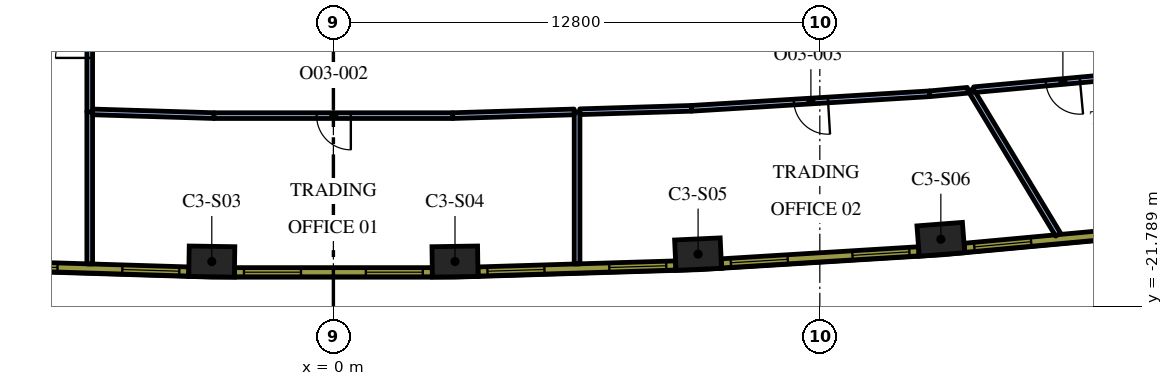
"""IFC4 building model, lengths in metres.
Left out: names, types, materials, properties, quantities, classifications, styles, units other than length and angle.
Written with IfcOpenShell. Run it as: python <this file> out.ifc"""

import sys

from ifc_helpers import new_model, si_unit, direction, frame, frame_2d, origin, origin_2d, place, context, subcontext, project, spatial, rectangle, extrude, element, fill, save


model = new_model("IFC4")
c1 = context("Model", 3, precision=1e-05, world=origin(), true_north=direction((0.0, 1.0)))
c2 = subcontext(c1, "Body", "Model", "MODEL_VIEW")
j1 = project(units=[si_unit("LENGTHUNIT", "METRE"), si_unit("PLANEANGLEUNIT", "RADIAN")], contexts=[c1])
p1 = place(None, origin())
s1 = spatial("IfcSite", under=j1, at=p1, CompositionType="ELEMENT")
p2 = place(p1, origin())
s2 = spatial("IfcBuilding", under=s1, at=p2, CompositionType="ELEMENT")
p3 = place(p2, frame((0.0, 0.0, 166.8)))
s3 = spatial("IfcBuildingStorey", under=s2, at=p3, CompositionType="ELEMENT", Elevation=166.8)
for number, where, z_axis, x_axis in (
    (1, (-3.2, -20.608, 0.0), (0.0, 0.0, 1.0), (1.0, -0.015, 0.0)),
    (2, (3.2, -20.608, 0.0), (0.0, 0.0, 1.0), (1.0, 0.015, 0.0)),
    (3, (9.597, -20.413, 0.0), (0.0, 0.0, 1.0), (0.999, 0.046, 0.0)),
    (4, (15.985, -20.022, 0.0), (0.0, 0.0, 1.0), (0.997, 0.076, 0.0)),
):
    element("IfcColumn", number, at=place(p3, frame(where, z_axis=z_axis, x_axis=x_axis)), inside=s3, PredefinedType="COLUMN", context=c2, shape_type="SweptSolid", body=[
        extrude(rectangle(XDim=1.2, YDim=0.8, at=origin_2d()), origin(), (0.0, 0.0, 1.0), 4.2),
    ])
p4 = place(p3, frame((-6.412, -16.664, 0.0), z_axis=(0.0, 0.0, 1.0), x_axis=(0.0, -1.0, 0.0)))
e5 = element("IfcWall", 5, at=p4, inside=s3, PredefinedType="PARTITIONING", context=c2, shape_type="SweptSolid", body=[
    extrude(rectangle(XDim=4.006, YDim=0.15, at=frame_2d((2.003, 0.0))), origin(), (0.0, 0.0, 1.0), 3.15),
])
p5 = place(p3, frame((-6.412, -16.672, 0.0), z_axis=(0.0, 0.0, 1.0), x_axis=(0.0, 1.0, 0.0)))
e6 = element("IfcWall", 6, at=p5, inside=s3, PredefinedType="PARTITIONING", context=c2, shape_type="SweptSolid", body=[
    extrude(rectangle(XDim=3.822, YDim=0.15, at=frame_2d((1.911, 0.0))), origin(), (0.0, 0.0, 1.0), 3.15),
])
p6 = place(p5, frame((1.422, 0.0, 0.0)))
e7 = element("IfcOpeningElement", 7, at=p6, cuts=e6, PredefinedType="OPENING", context=c2, shape_type="SweptSolid", body=[
    extrude(rectangle(XDim=0.9, YDim=2.1, at=frame_2d((0.45, 1.05))), frame((0.0, 0.085, 0.0), z_axis=(0.0, -1.0, 0.0), x_axis=(1.0, 0.0, 0.0)), (0.0, 0.0, 1.0), 0.17),
])
p7 = place(p3, frame((6.412, -16.668, 0.0), z_axis=(0.0, 0.0, 1.0), x_axis=(0.0, -1.0, 0.0)))
e8 = element("IfcWall", 8, at=p7, inside=s3, PredefinedType="PARTITIONING", context=c2, shape_type="SweptSolid", body=[
    extrude(rectangle(XDim=4.002, YDim=0.15, at=frame_2d((2.001, 0.0))), origin(), (0.0, 0.0, 1.0), 3.15),
])
p8 = place(p3, frame((-6.337, -16.671, 0.0), z_axis=(0.0, 0.0, 1.0), x_axis=(0.999533369646, -0.030545751995, 0.0)))
e9 = element("IfcWall", 9, at=p8, inside=s3, PredefinedType="PARTITIONING", context=c2, shape_type="SweptSolid", body=[
    extrude(rectangle(XDim=3.197, YDim=0.15, at=frame_2d((1.599, 0.0))), origin(), (0.0, 0.0, 1.0), 3.15),
])
p9 = place(p3, frame((3.141, -16.768, 0.0), z_axis=(0.0, 0.0, 1.0), x_axis=(-1.0, 0.0, 0.0)))
e10 = element("IfcWall", 10, at=p9, inside=s3, PredefinedType="PARTITIONING", context=c2, shape_type="SweptSolid", body=[
    extrude(rectangle(XDim=6.283, YDim=0.15, at=frame_2d((3.141, 0.0))), origin(), (0.0, 0.0, 1.0), 3.15),
])
p10 = place(p9, frame((2.683, 0.0, 0.0)))
e11 = element("IfcOpeningElement", 11, at=p10, cuts=e10, PredefinedType="OPENING", context=c2, shape_type="SweptSolid", body=[
    extrude(rectangle(XDim=0.9, YDim=2.1, at=frame_2d((0.45, 1.05))), frame((0.0, 0.085, 0.0), z_axis=(0.0, -1.0, 0.0), x_axis=(1.0, 0.0, 0.0)), (0.0, 0.0, 1.0), 0.17),
])
p11 = place(p3, frame((3.141, -16.768, 0.0), z_axis=(0.0, 0.0, 1.0), x_axis=(0.999533369646, 0.030545751995, 0.0)))
e12 = element("IfcWall", 12, at=p11, inside=s3, PredefinedType="PARTITIONING", context=c2, shape_type="SweptSolid", body=[
    extrude(rectangle(XDim=3.197, YDim=0.15, at=frame_2d((1.599, 0.0))), origin(), (0.0, 0.0, 1.0), 3.15),
])
p12 = place(p3, frame((16.773, -16.094, 0.0), z_axis=(0.0, 0.0, 1.0), x_axis=(0.516844039178, -0.856079575253, 0.0)))
e13 = element("IfcWall", 13, at=p12, inside=s3, PredefinedType="PARTITIONING", context=c2, shape_type="SweptSolid", body=[
    extrude(rectangle(XDim=4.446, YDim=0.15, at=frame_2d((2.223, 0.0))), origin(), (0.0, 0.0, 1.0), 3.15),
])
p13 = place(p3, frame((6.487, -16.666, 0.0), z_axis=(0.0, 0.0, 1.0), x_axis=(0.999533978083, 0.030525835896, 0.0)))
e14 = element("IfcWall", 14, at=p13, inside=s3, PredefinedType="PARTITIONING", context=c2, shape_type="SweptSolid", body=[
    extrude(rectangle(XDim=2.935, YDim=0.15, at=frame_2d((1.468, 0.0))), origin(), (0.0, 0.0, 1.0), 3.15),
])
p14 = place(p3, frame((15.692, -16.193, 0.0), z_axis=(0.0, 0.0, 1.0), x_axis=(-0.998137075468, -0.061011298754, 0.0)))
e15 = element("IfcWall", 15, at=p14, inside=s3, PredefinedType="PARTITIONING", context=c2, shape_type="SweptSolid", body=[
    extrude(rectangle(XDim=6.282, YDim=0.15, at=frame_2d((3.141, 0.0))), origin(), (0.0, 0.0, 1.0), 3.15),
])
p15 = place(p14, frame((2.683, 0.0, 0.0)))
e16 = element("IfcOpeningElement", 16, at=p15, cuts=e15, PredefinedType="OPENING", context=c2, shape_type="SweptSolid", body=[
    extrude(rectangle(XDim=0.9, YDim=2.1, at=frame_2d((0.45, 1.05))), frame((0.0, 0.085, 0.0), z_axis=(0.0, -1.0, 0.0), x_axis=(1.0, 0.0, 0.0)), (0.0, 0.0, 1.0), 0.17),
])
p16 = place(p3, frame((15.692, -16.193, 0.0), z_axis=(0.0, 0.0, 1.0), x_axis=(0.995818997537, 0.091348366946, 0.0)))
e17 = element("IfcWall", 17, at=p16, inside=s3, PredefinedType="PARTITIONING", context=c2, shape_type="SweptSolid", body=[
    extrude(rectangle(XDim=1.002, YDim=0.15, at=frame_2d((0.501, 0.0))), origin(), (0.0, 0.0, 1.0), 3.15),
])
p17 = place(p3, frame((21.525, -15.657, 0.0), z_axis=(0.0, 0.0, 1.0), x_axis=(-0.99581172086, -0.091427657734, 0.0)))
e18 = element("IfcWall", 18, at=p17, inside=s3, PredefinedType="PARTITIONING", context=c2, shape_type="SweptSolid", body=[
    extrude(rectangle(XDim=4.689, YDim=0.15, at=frame_2d((2.344, 0.0))), origin(), (0.0, 0.0, 1.0), 3.15),
])
p18 = place(p17, frame((1.889, 0.0, 0.0)))
e19 = element("IfcOpeningElement", 19, at=p18, cuts=e18, PredefinedType="OPENING", context=c2, shape_type="SweptSolid", body=[
    extrude(rectangle(XDim=0.9, YDim=2.1, at=frame_2d((0.45, 1.05))), frame((0.0, 0.085, 0.0), z_axis=(0.0, -1.0, 0.0), x_axis=(1.0, 0.0, 0.0)), (0.0, 0.0, 1.0), 0.17),
])
p19 = place(p3, frame((-9.007, -20.711, 0.0), z_axis=(0.0, 0.0, 1.0), x_axis=(0.999533441983, -0.030543384845, 0.0)))
e20 = element("IfcWall", 20, at=p19, inside=s3, PredefinedType="SOLIDWALL", context=c2, shape_type="SweptSolid", body=[
    extrude(rectangle(XDim=5.204, YDim=0.24, at=frame_2d((2.602, 0.0))), origin(), (0.0, 0.0, 1.0), 3.95),
])
p20 = place(p19, frame((0.248, 0.0, 0.9)))
e21 = element("IfcOpeningElement", 21, at=p20, cuts=e20, PredefinedType="OPENING", context=c2, shape_type="SweptSolid", body=[
    extrude(rectangle(XDim=1.5, YDim=2.55, at=frame_2d((0.75, 1.275))), frame((0.0, 0.13, 0.0), z_axis=(0.0, -1.0, 0.0), x_axis=(1.0, 0.0, 0.0)), (0.0, 0.0, 1.0), 0.26),
])
p21 = place(p19, frame((3.455, 0.0, 0.9)))
e22 = element("IfcOpeningElement", 22, at=p21, cuts=e20, PredefinedType="OPENING", context=c2, shape_type="SweptSolid", body=[
    extrude(rectangle(XDim=1.5, YDim=2.55, at=frame_2d((0.75, 1.275))), frame((0.0, 0.13, 0.0), z_axis=(0.0, -1.0, 0.0), x_axis=(1.0, 0.0, 0.0)), (0.0, 0.0, 1.0), 0.26),
])
p22 = place(p3, frame((-2.602, -20.888, 0.0), z_axis=(0.0, 0.0, 1.0), x_axis=(1.0, 0.0, 0.0)))
e23 = element("IfcWall", 23, at=p22, inside=s3, PredefinedType="SOLIDWALL", context=c2, shape_type="SweptSolid", body=[
    extrude(rectangle(XDim=5.204, YDim=0.24, at=frame_2d((2.602, 0.0))), origin(), (0.0, 0.0, 1.0), 3.95),
])
p23 = place(p22, frame((0.248, 0.0, 0.9)))
e24 = element("IfcOpeningElement", 24, at=p23, cuts=e23, PredefinedType="OPENING", context=c2, shape_type="SweptSolid", body=[
    extrude(rectangle(XDim=1.5, YDim=2.55, at=frame_2d((0.75, 1.275))), frame((0.0, 0.13, 0.0), z_axis=(0.0, -1.0, 0.0), x_axis=(1.0, 0.0, 0.0)), (0.0, 0.0, 1.0), 0.26),
])
p24 = place(p22, frame((3.455, 0.0, 0.9)))
e25 = element("IfcOpeningElement", 25, at=p24, cuts=e23, PredefinedType="OPENING", context=c2, shape_type="SweptSolid", body=[
    extrude(rectangle(XDim=1.5, YDim=2.55, at=frame_2d((0.75, 1.275))), frame((0.0, 0.13, 0.0), z_axis=(0.0, -1.0, 0.0), x_axis=(1.0, 0.0, 0.0)), (0.0, 0.0, 1.0), 0.26),
])
p25 = place(p3, frame((3.806, -20.87, 0.0), z_axis=(0.0, 0.0, 1.0), x_axis=(0.999533441983, 0.030543384845, 0.0)))
e26 = element("IfcWall", 26, at=p25, inside=s3, PredefinedType="SOLIDWALL", context=c2, shape_type="SweptSolid", body=[
    extrude(rectangle(XDim=5.204, YDim=0.24, at=frame_2d((2.602, 0.0))), origin(), (0.0, 0.0, 1.0), 3.95),
])
p26 = place(p25, frame((0.248, 0.0, 0.9)))
e27 = element("IfcOpeningElement", 27, at=p26, cuts=e26, PredefinedType="OPENING", context=c2, shape_type="SweptSolid", body=[
    extrude(rectangle(XDim=1.5, YDim=2.55, at=frame_2d((0.75, 1.275))), frame((0.0, 0.13, 0.0), z_axis=(0.0, -1.0, 0.0), x_axis=(1.0, 0.0, 0.0)), (0.0, 0.0, 1.0), 0.26),
])
p27 = place(p25, frame((3.455, 0.0, 0.9)))
e28 = element("IfcOpeningElement", 28, at=p27, cuts=e26, PredefinedType="OPENING", context=c2, shape_type="SweptSolid", body=[
    extrude(rectangle(XDim=1.5, YDim=2.55, at=frame_2d((0.75, 1.275))), frame((0.0, 0.13, 0.0), z_axis=(0.0, -1.0, 0.0), x_axis=(1.0, 0.0, 0.0)), (0.0, 0.0, 1.0), 0.26),
])
p28 = place(p3, frame((10.211, -20.656, 0.0), z_axis=(0.0, 0.0, 1.0), x_axis=(0.998135294646, 0.061040425794, 0.0)))
e29 = element("IfcWall", 29, at=p28, inside=s3, PredefinedType="SOLIDWALL", context=c2, shape_type="SweptSolid", body=[
    extrude(rectangle(XDim=5.204, YDim=0.24, at=frame_2d((2.602, 0.0))), origin(), (0.0, 0.0, 1.0), 3.95),
])
p29 = place(p28, frame((0.248, 0.0, 0.9)))
e30 = element("IfcOpeningElement", 30, at=p29, cuts=e29, PredefinedType="OPENING", context=c2, shape_type="SweptSolid", body=[
    extrude(rectangle(XDim=1.5, YDim=2.55, at=frame_2d((0.75, 1.275))), frame((0.0, 0.13, 0.0), z_axis=(0.0, -1.0, 0.0), x_axis=(1.0, 0.0, 0.0)), (0.0, 0.0, 1.0), 0.26),
])
p30 = place(p28, frame((3.455, 0.0, 0.9)))
e31 = element("IfcOpeningElement", 31, at=p30, cuts=e29, PredefinedType="OPENING", context=c2, shape_type="SweptSolid", body=[
    extrude(rectangle(XDim=1.5, YDim=2.55, at=frame_2d((0.75, 1.275))), frame((0.0, 0.13, 0.0), z_axis=(0.0, -1.0, 0.0), x_axis=(1.0, 0.0, 0.0)), (0.0, 0.0, 1.0), 0.26),
])
p31 = place(p3, frame((16.606, -20.247, 0.0), z_axis=(0.0, 0.0, 1.0), x_axis=(0.995808712151, 0.091460422067, 0.0)))
e32 = element("IfcWall", 32, at=p31, inside=s3, PredefinedType="SOLIDWALL", context=c2, shape_type="SweptSolid", body=[
    extrude(rectangle(XDim=5.213, YDim=0.24, at=frame_2d((2.606, 0.0))), origin(), (0.0, 0.0, 1.0), 3.95),
])
p32 = place(p31, frame((0.261, 0.0, 0.9)))
e33 = element("IfcOpeningElement", 33, at=p32, cuts=e32, PredefinedType="OPENING", context=c2, shape_type="SweptSolid", body=[
    extrude(rectangle(XDim=1.5, YDim=2.55, at=frame_2d((0.75, 1.275))), frame((0.0, 0.13, 0.0), z_axis=(0.0, -1.0, 0.0), x_axis=(1.0, 0.0, 0.0)), (0.0, 0.0, 1.0), 0.26),
])
p33 = place(p31, frame((3.492, 0.0, 0.9)))
e34 = element("IfcOpeningElement", 34, at=p33, cuts=e32, PredefinedType="OPENING", context=c2, shape_type="SweptSolid", body=[
    extrude(rectangle(XDim=1.5, YDim=2.55, at=frame_2d((0.75, 1.275))), frame((0.0, 0.13, 0.0), z_axis=(0.0, -1.0, 0.0), x_axis=(1.0, 0.0, 0.0)), (0.0, 0.0, 1.0), 0.26),
])
p34 = place(p6, origin())
e35 = element("IfcDoor", 35, at=p34, inside=s3, OperationType="SINGLE_SWING_LEFT", PredefinedType="DOOR", context=c2, shape_type="SweptSolid", body=[
    extrude(rectangle(XDim=0.9, YDim=2.1, at=frame_2d((0.45, 1.05))), frame((0.0, 0.025, 0.0), z_axis=(0.0, -1.0, 0.0), x_axis=(1.0, 0.0, 0.0)), (0.0, 0.0, 1.0), 0.05),
])
fill(e7, e35)
p35 = place(p10, origin())
e36 = element("IfcDoor", 36, at=p35, inside=s3, OperationType="SINGLE_SWING_LEFT", PredefinedType="DOOR", context=c2, shape_type="SweptSolid", body=[
    extrude(rectangle(XDim=0.9, YDim=2.1, at=frame_2d((0.45, 1.05))), frame((0.0, 0.025, 0.0), z_axis=(0.0, -1.0, 0.0), x_axis=(1.0, 0.0, 0.0)), (0.0, 0.0, 1.0), 0.05),
])
fill(e11, e36)
p36 = place(p15, origin())
e37 = element("IfcDoor", 37, at=p36, inside=s3, OperationType="SINGLE_SWING_LEFT", PredefinedType="DOOR", context=c2, shape_type="SweptSolid", body=[
    extrude(rectangle(XDim=0.9, YDim=2.1, at=frame_2d((0.45, 1.05))), frame((0.0, 0.025, 0.0), z_axis=(0.0, -1.0, 0.0), x_axis=(1.0, 0.0, 0.0)), (0.0, 0.0, 1.0), 0.05),
])
fill(e16, e37)
p37 = place(p18, origin())
e38 = element("IfcDoor", 38, at=p37, inside=s3, OperationType="SINGLE_SWING_LEFT", PredefinedType="DOOR", context=c2, shape_type="SweptSolid", body=[
    extrude(rectangle(XDim=0.9, YDim=2.1, at=frame_2d((0.45, 1.05))), frame((0.0, 0.025, 0.0), z_axis=(0.0, -1.0, 0.0), x_axis=(1.0, 0.0, 0.0)), (0.0, 0.0, 1.0), 0.05),
])
fill(e19, e38)
p38 = place(p20, origin())
e39 = element("IfcWindow", 39, at=p38, inside=s3, PartitioningType="SINGLE_PANEL", PredefinedType="WINDOW", context=c2, shape_type="SweptSolid", body=[
    extrude(rectangle(XDim=1.5, YDim=2.55, at=frame_2d((0.75, 1.275))), frame((0.0, 0.04, 0.0), z_axis=(0.0, -1.0, 0.0), x_axis=(1.0, 0.0, 0.0)), (0.0, 0.0, 1.0), 0.06),
])
fill(e21, e39)
p39 = place(p21, origin())
e40 = element("IfcWindow", 40, at=p39, inside=s3, PartitioningType="SINGLE_PANEL", PredefinedType="WINDOW", context=c2, shape_type="SweptSolid", body=[
    extrude(rectangle(XDim=1.5, YDim=2.55, at=frame_2d((0.75, 1.275))), frame((0.0, 0.04, 0.0), z_axis=(0.0, -1.0, 0.0), x_axis=(1.0, 0.0, 0.0)), (0.0, 0.0, 1.0), 0.06),
])
fill(e22, e40)
p40 = place(p23, origin())
e41 = element("IfcWindow", 41, at=p40, inside=s3, PartitioningType="SINGLE_PANEL", PredefinedType="WINDOW", context=c2, shape_type="SweptSolid", body=[
    extrude(rectangle(XDim=1.5, YDim=2.55, at=frame_2d((0.75, 1.275))), frame((0.0, 0.04, 0.0), z_axis=(0.0, -1.0, 0.0), x_axis=(1.0, 0.0, 0.0)), (0.0, 0.0, 1.0), 0.06),
])
fill(e24, e41)
p41 = place(p24, origin())
e42 = element("IfcWindow", 42, at=p41, inside=s3, PartitioningType="SINGLE_PANEL", PredefinedType="WINDOW", context=c2, shape_type="SweptSolid", body=[
    extrude(rectangle(XDim=1.5, YDim=2.55, at=frame_2d((0.75, 1.275))), frame((0.0, 0.04, 0.0), z_axis=(0.0, -1.0, 0.0), x_axis=(1.0, 0.0, 0.0)), (0.0, 0.0, 1.0), 0.06),
])
fill(e25, e42)
p42 = place(p26, origin())
e43 = element("IfcWindow", 43, at=p42, inside=s3, PartitioningType="SINGLE_PANEL", PredefinedType="WINDOW", context=c2, shape_type="SweptSolid", body=[
    extrude(rectangle(XDim=1.5, YDim=2.55, at=frame_2d((0.75, 1.275))), frame((0.0, 0.04, 0.0), z_axis=(0.0, -1.0, 0.0), x_axis=(1.0, 0.0, 0.0)), (0.0, 0.0, 1.0), 0.06),
])
fill(e27, e43)
p43 = place(p27, origin())
e44 = element("IfcWindow", 44, at=p43, inside=s3, PartitioningType="SINGLE_PANEL", PredefinedType="WINDOW", context=c2, shape_type="SweptSolid", body=[
    extrude(rectangle(XDim=1.5, YDim=2.55, at=frame_2d((0.75, 1.275))), frame((0.0, 0.04, 0.0), z_axis=(0.0, -1.0, 0.0), x_axis=(1.0, 0.0, 0.0)), (0.0, 0.0, 1.0), 0.06),
])
fill(e28, e44)
p44 = place(p29, origin())
e45 = element("IfcWindow", 45, at=p44, inside=s3, PartitioningType="SINGLE_PANEL", PredefinedType="WINDOW", context=c2, shape_type="SweptSolid", body=[
    extrude(rectangle(XDim=1.5, YDim=2.55, at=frame_2d((0.75, 1.275))), frame((0.0, 0.04, 0.0), z_axis=(0.0, -1.0, 0.0), x_axis=(1.0, 0.0, 0.0)), (0.0, 0.0, 1.0), 0.06),
])
fill(e30, e45)
p45 = place(p30, origin())
e46 = element("IfcWindow", 46, at=p45, inside=s3, PartitioningType="SINGLE_PANEL", PredefinedType="WINDOW", context=c2, shape_type="SweptSolid", body=[
    extrude(rectangle(XDim=1.5, YDim=2.55, at=frame_2d((0.75, 1.275))), frame((0.0, 0.04, 0.0), z_axis=(0.0, -1.0, 0.0), x_axis=(1.0, 0.0, 0.0)), (0.0, 0.0, 1.0), 0.06),
])
fill(e31, e46)
p46 = place(p32, origin())
e47 = element("IfcWindow", 47, at=p46, inside=s3, PartitioningType="SINGLE_PANEL", PredefinedType="WINDOW", context=c2, shape_type="SweptSolid", body=[
    extrude(rectangle(XDim=1.5, YDim=2.55, at=frame_2d((0.75, 1.275))), frame((0.0, 0.04, 0.0), z_axis=(0.0, -1.0, 0.0), x_axis=(1.0, 0.0, 0.0)), (0.0, 0.0, 1.0), 0.06),
])
fill(e33, e47)
save(model, sys.argv[1])
